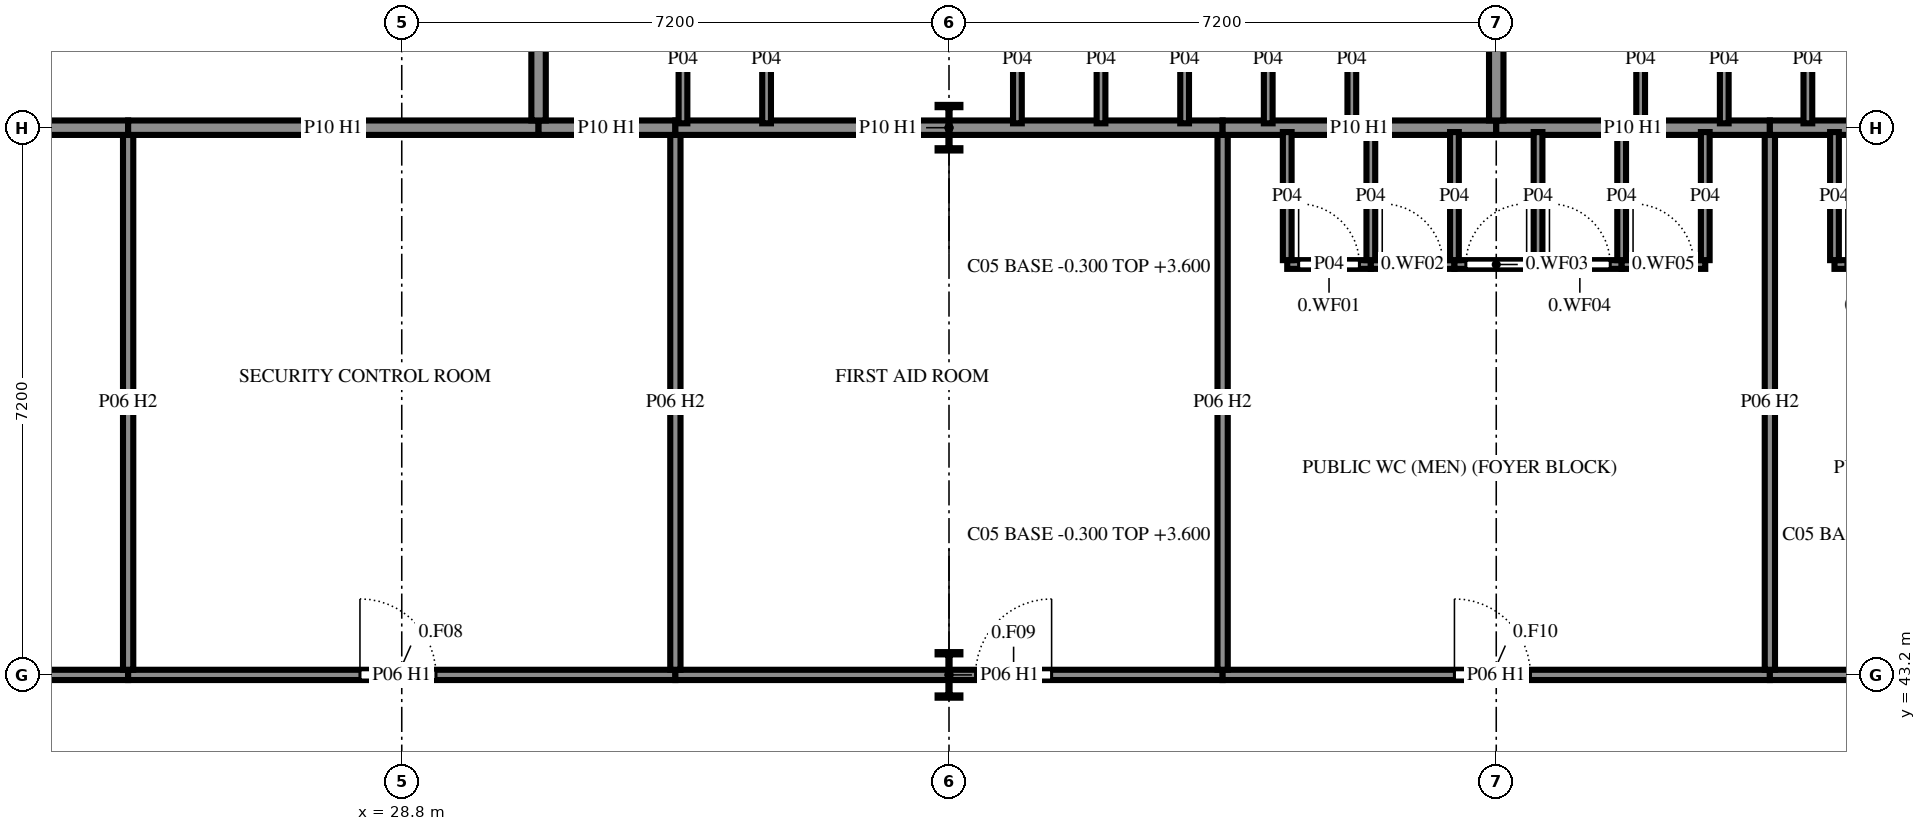
"""IFC4 building model, lengths in metres.
Left out: names, types, materials, properties, quantities, classifications, styles, units other than length and angle.
Written with IfcOpenShell. Run it as: python <this file> out.ifc"""

import sys

from ifc_helpers import new_model, si_unit, direction, frame, frame_2d, origin, origin_2d, place, context, subcontext, project, spatial, rectangle, i_section, extrude, element, fill, save


model = new_model("IFC4")
c1 = context("Model", 3, precision=1e-05, world=origin(), true_north=direction((0.0, 1.0)))
c2 = subcontext(c1, "Body", "Model", "MODEL_VIEW")
j1 = project(units=[si_unit("LENGTHUNIT", "METRE"), si_unit("PLANEANGLEUNIT", "RADIAN")], contexts=[c1])
p1 = place(None, origin())
s1 = spatial("IfcSite", under=j1, at=p1, CompositionType="ELEMENT")
p2 = place(p1, origin())
s2 = spatial("IfcBuilding", under=s1, at=p2, CompositionType="ELEMENT")
p3 = place(p2, origin())
s3 = spatial("IfcBuildingStorey", under=s2, at=p3, CompositionType="ELEMENT", Elevation=0.0)
for number, where, z_axis, x_axis in (
    (1, (36.0, 43.2, -0.3), (0.0, 0.0, 1.0), (1.0, 0.0, 0.0)),
    (2, (36.0, 50.4, -0.3), (0.0, 0.0, 1.0), (1.0, 0.0, 0.0)),
):
    element("IfcColumn", number, at=place(p3, frame(where, z_axis=z_axis, x_axis=x_axis)), inside=s3, PredefinedType="COLUMN", context=c2, shape_type="SweptSolid", body=[
        extrude(i_section(OverallWidth=0.3, OverallDepth=0.6, WebThickness=0.015, FlangeThickness=0.03, FilletRadius=0.027, at=origin_2d()), origin(), (0.0, 0.0, 1.0), 3.9),
    ])
p4 = place(p3, frame((17.933, 43.2, 0.0), z_axis=(0.0, 0.0, 1.0), x_axis=(1.0, 0.0, 0.0)))
e3 = element("IfcWall", 3, at=p4, inside=s3, PredefinedType="PARTITIONING", context=c2, shape_type="SweptSolid", body=[
    extrude(rectangle(XDim=7.267, YDim=0.135, at=frame_2d((3.634, 0.0))), origin(), (0.0, 0.0, 1.0), 2.82),
])
p5 = place(p4, frame((2.25, 0.0, 0.0)))
e4 = element("IfcOpeningElement", 4, at=p5, cuts=e3, PredefinedType="OPENING", context=c2, shape_type="SweptSolid", body=[
    extrude(rectangle(XDim=1.0, YDim=2.4, at=frame_2d((0.5, 1.2))), frame((0.0, 0.077, 0.0), z_axis=(0.0, -1.0, 0.0), x_axis=(1.0, 0.0, 0.0)), (0.0, 0.0, 1.0), 0.155),
])
p6 = place(p3, frame((25.2, 43.2, 0.0), z_axis=(0.0, 0.0, 1.0), x_axis=(1.0, 0.0, 0.0)))
e5 = element("IfcWall", 5, at=p6, inside=s3, PredefinedType="PARTITIONING", context=c2, shape_type="SweptSolid", body=[
    extrude(rectangle(XDim=7.2, YDim=0.135, at=frame_2d((3.6, 0.0))), origin(), (0.0, 0.0, 1.0), 2.82),
])
p7 = place(p6, frame((3.05, 0.0, 0.0)))
e6 = element("IfcOpeningElement", 6, at=p7, cuts=e5, PredefinedType="OPENING", context=c2, shape_type="SweptSolid", body=[
    extrude(rectangle(XDim=1.0, YDim=2.4, at=frame_2d((0.5, 1.2))), frame((0.0, 0.077, 0.0), z_axis=(0.0, -1.0, 0.0), x_axis=(1.0, 0.0, 0.0)), (0.0, 0.0, 1.0), 0.155),
])
p8 = place(p3, frame((32.4, 43.2, 0.0), z_axis=(0.0, 0.0, 1.0), x_axis=(1.0, 0.0, 0.0)))
e7 = element("IfcWall", 7, at=p8, inside=s3, PredefinedType="PARTITIONING", context=c2, shape_type="SweptSolid", body=[
    extrude(rectangle(XDim=7.2, YDim=0.135, at=frame_2d((3.6, 0.0))), origin(), (0.0, 0.0, 1.0), 2.82),
])
p9 = place(p8, frame((3.95, 0.0, 0.0)))
e8 = element("IfcOpeningElement", 8, at=p9, cuts=e7, PredefinedType="OPENING", context=c2, shape_type="SweptSolid", body=[
    extrude(rectangle(XDim=1.0, YDim=2.4, at=frame_2d((0.5, 1.2))), frame((0.0, 0.077, 0.0), z_axis=(0.0, -1.0, 0.0), x_axis=(1.0, 0.0, 0.0)), (0.0, 0.0, 1.0), 0.155),
])
p10 = place(p3, frame((39.6, 43.2, 0.0), z_axis=(0.0, 0.0, 1.0), x_axis=(1.0, 0.0, 0.0)))
e9 = element("IfcWall", 9, at=p10, inside=s3, PredefinedType="PARTITIONING", context=c2, shape_type="SweptSolid", body=[
    extrude(rectangle(XDim=7.2, YDim=0.135, at=frame_2d((3.6, 0.0))), origin(), (0.0, 0.0, 1.0), 2.82),
])
p11 = place(p10, frame((3.05, 0.0, 0.0)))
e10 = element("IfcOpeningElement", 10, at=p11, cuts=e9, PredefinedType="OPENING", context=c2, shape_type="SweptSolid", body=[
    extrude(rectangle(XDim=1.0, YDim=2.4, at=frame_2d((0.5, 1.2))), frame((0.0, 0.077, 0.0), z_axis=(0.0, -1.0, 0.0), x_axis=(1.0, 0.0, 0.0)), (0.0, 0.0, 1.0), 0.155),
])
p12 = place(p3, frame((46.8, 43.2, 0.0), z_axis=(0.0, 0.0, 1.0), x_axis=(1.0, 0.0, 0.0)))
e11 = element("IfcWall", 11, at=p12, inside=s3, PredefinedType="PARTITIONING", context=c2, shape_type="SweptSolid", body=[
    extrude(rectangle(XDim=7.2, YDim=0.135, at=frame_2d((3.6, 0.0))), origin(), (0.0, 0.0, 1.0), 2.82),
])
p13 = place(p12, frame((3.95, 0.0, 0.0)))
e12 = element("IfcOpeningElement", 12, at=p13, cuts=e11, PredefinedType="OPENING", context=c2, shape_type="SweptSolid", body=[
    extrude(rectangle(XDim=1.0, YDim=2.4, at=frame_2d((0.5, 1.2))), frame((0.0, 0.077, 0.0), z_axis=(0.0, -1.0, 0.0), x_axis=(1.0, 0.0, 0.0)), (0.0, 0.0, 1.0), 0.155),
])
p14 = place(p3, frame((25.2, 50.305, 0.0), z_axis=(0.0, 0.0, 1.0), x_axis=(0.0, -1.0, 0.0)))
e13 = element("IfcWall", 13, at=p14, inside=s3, PredefinedType="PARTITIONING", context=c2, shape_type="SweptSolid", body=[
    extrude(rectangle(XDim=7.037, YDim=0.135, at=frame_2d((3.519, 0.0))), origin(), (0.0, 0.0, 1.0), 3.12),
])
p15 = place(p3, frame((21.6, 50.4, 0.0), z_axis=(0.0, 0.0, 1.0), x_axis=(1.0, 0.0, 0.0)))
e14 = element("IfcWall", 14, at=p15, inside=s3, PredefinedType="PARTITIONING", context=c2, shape_type="SweptSolid", body=[
    extrude(rectangle(XDim=3.6, YDim=0.19, at=frame_2d((1.8, 0.0))), origin(), (0.0, 0.0, 1.0), 2.82),
])
p16 = place(p3, frame((32.4, 50.305, 0.0), z_axis=(0.0, 0.0, 1.0), x_axis=(0.0, -1.0, 0.0)))
e15 = element("IfcWall", 15, at=p16, inside=s3, PredefinedType="PARTITIONING", context=c2, shape_type="SweptSolid", body=[
    extrude(rectangle(XDim=7.037, YDim=0.135, at=frame_2d((3.519, 0.0))), origin(), (0.0, 0.0, 1.0), 3.12),
])
p17 = place(p3, frame((25.2, 50.4, 0.0), z_axis=(0.0, 0.0, 1.0), x_axis=(1.0, 0.0, 0.0)))
e16 = element("IfcWall", 16, at=p17, inside=s3, PredefinedType="PARTITIONING", context=c2, shape_type="SweptSolid", body=[
    extrude(rectangle(XDim=5.4, YDim=0.19, at=frame_2d((2.7, 0.0))), origin(), (0.0, 0.0, 1.0), 2.82),
])
p18 = place(p3, frame((30.6, 50.4, 0.0), z_axis=(0.0, 0.0, 1.0), x_axis=(1.0, 0.0, 0.0)))
e17 = element("IfcWall", 17, at=p18, inside=s3, PredefinedType="PARTITIONING", context=c2, shape_type="SweptSolid", body=[
    extrude(rectangle(XDim=1.8, YDim=0.19, at=frame_2d((0.9, 0.0))), origin(), (0.0, 0.0, 1.0), 2.82),
])
p19 = place(p3, frame((39.6, 50.305, 0.0), z_axis=(0.0, 0.0, 1.0), x_axis=(0.0, -1.0, 0.0)))
e18 = element("IfcWall", 18, at=p19, inside=s3, PredefinedType="PARTITIONING", context=c2, shape_type="SweptSolid", body=[
    extrude(rectangle(XDim=7.037, YDim=0.135, at=frame_2d((3.519, 0.0))), origin(), (0.0, 0.0, 1.0), 3.12),
])
p20 = place(p3, frame((32.4, 50.4, 0.0), z_axis=(0.0, 0.0, 1.0), x_axis=(1.0, 0.0, 0.0)))
e19 = element("IfcWall", 19, at=p20, inside=s3, PredefinedType="PARTITIONING", context=c2, shape_type="SweptSolid", body=[
    extrude(rectangle(XDim=7.2, YDim=0.19, at=frame_2d((3.6, 0.0))), origin(), (0.0, 0.0, 1.0), 2.82),
])
p21 = place(p3, frame((46.8, 50.305, 0.0), z_axis=(0.0, 0.0, 1.0), x_axis=(0.0, -1.0, 0.0)))
e20 = element("IfcWall", 20, at=p21, inside=s3, PredefinedType="PARTITIONING", context=c2, shape_type="SweptSolid", body=[
    extrude(rectangle(XDim=7.037, YDim=0.135, at=frame_2d((3.519, 0.0))), origin(), (0.0, 0.0, 1.0), 3.12),
])
p22 = place(p3, frame((39.6, 50.4, 0.0), z_axis=(0.0, 0.0, 1.0), x_axis=(1.0, 0.0, 0.0)))
e21 = element("IfcWall", 21, at=p22, inside=s3, PredefinedType="PARTITIONING", context=c2, shape_type="SweptSolid", body=[
    extrude(rectangle(XDim=3.6, YDim=0.19, at=frame_2d((1.8, 0.0))), origin(), (0.0, 0.0, 1.0), 2.82),
])
p23 = place(p3, frame((43.2, 50.4, 0.0), z_axis=(0.0, 0.0, 1.0), x_axis=(1.0, 0.0, 0.0)))
e22 = element("IfcWall", 22, at=p23, inside=s3, PredefinedType="PARTITIONING", context=c2, shape_type="SweptSolid", body=[
    extrude(rectangle(XDim=3.6, YDim=0.19, at=frame_2d((1.8, 0.0))), origin(), (0.0, 0.0, 1.0), 2.82),
])
p24 = place(p3, frame((46.8, 50.4, 0.0), z_axis=(0.0, 0.0, 1.0), x_axis=(1.0, 0.0, 0.0)))
e23 = element("IfcWall", 23, at=p24, inside=s3, PredefinedType="PARTITIONING", context=c2, shape_type="SweptSolid", body=[
    extrude(rectangle(XDim=7.2, YDim=0.19, at=frame_2d((3.6, 0.0))), origin(), (0.0, 0.0, 1.0), 2.82),
])
p25 = place(p3, frame((30.6, 58.105, 0.0), z_axis=(0.0, 0.0, 1.0), x_axis=(0.0, -1.0, 0.0)))
e24 = element("IfcWall", 24, at=p25, inside=s3, PredefinedType="PARTITIONING", context=c2, shape_type="SweptSolid", body=[
    extrude(rectangle(XDim=7.61, YDim=0.19, at=frame_2d((3.805, 0.0))), origin(), (0.0, 0.0, 1.0), 3.42),
])
p26 = place(p3, frame((43.2, 58.105, 0.0), z_axis=(0.0, 0.0, 1.0), x_axis=(0.0, -1.0, 0.0)))
e25 = element("IfcWall", 25, at=p26, inside=s3, PredefinedType="PARTITIONING", context=c2, shape_type="SweptSolid", body=[
    extrude(rectangle(XDim=7.61, YDim=0.19, at=frame_2d((3.805, 0.0))), origin(), (0.0, 0.0, 1.0), 3.11),
])
p27 = place(p3, frame((40.45, 48.6, 0.0), z_axis=(0.0, 0.0, 1.0), x_axis=(1.0, 0.0, 0.0)))
e26 = element("IfcWall", 26, at=p27, inside=s3, PredefinedType="PARTITIONING", context=c2, shape_type="SweptSolid", body=[
    extrude(rectangle(XDim=1.1, YDim=0.115, at=frame_2d((0.55, 0.0))), origin(), (0.0, 0.0, 1.0), 3.42),
])
p28 = place(p27, frame((0.15, 0.0, 0.0)))
e27 = element("IfcOpeningElement", 27, at=p28, cuts=e26, PredefinedType="OPENING", context=c2, shape_type="SweptSolid", body=[
    extrude(rectangle(XDim=0.8, YDim=2.1, at=frame_2d((0.4, 1.05))), frame((0.0, 0.067, 0.0), z_axis=(0.0, -1.0, 0.0), x_axis=(1.0, 0.0, 0.0)), (0.0, 0.0, 1.0), 0.135),
])
p29 = place(p3, frame((40.45, 50.343, 0.0), z_axis=(0.0, 0.0, 1.0), x_axis=(0.0, -1.0, 0.0)))
e28 = element("IfcWall", 28, at=p29, inside=s3, PredefinedType="PARTITIONING", context=c2, shape_type="SweptSolid", body=[
    extrude(rectangle(XDim=1.685, YDim=0.115, at=frame_2d((0.843, 0.0))), origin(), (0.0, 0.0, 1.0), 3.42),
])
p30 = place(p3, frame((41.55, 48.6, 0.0), z_axis=(0.0, 0.0, 1.0), x_axis=(1.0, 0.0, 0.0)))
e29 = element("IfcWall", 29, at=p30, inside=s3, PredefinedType="PARTITIONING", context=c2, shape_type="SweptSolid", body=[
    extrude(rectangle(XDim=1.1, YDim=0.115, at=frame_2d((0.55, 0.0))), origin(), (0.0, 0.0, 1.0), 3.42),
])
p31 = place(p30, frame((0.15, 0.0, 0.0)))
e30 = element("IfcOpeningElement", 30, at=p31, cuts=e29, PredefinedType="OPENING", context=c2, shape_type="SweptSolid", body=[
    extrude(rectangle(XDim=0.8, YDim=2.1, at=frame_2d((0.4, 1.05))), frame((0.0, 0.067, 0.0), z_axis=(0.0, -1.0, 0.0), x_axis=(1.0, 0.0, 0.0)), (0.0, 0.0, 1.0), 0.135),
])
p32 = place(p3, frame((41.55, 50.343, 0.0), z_axis=(0.0, 0.0, 1.0), x_axis=(0.0, -1.0, 0.0)))
e31 = element("IfcWall", 31, at=p32, inside=s3, PredefinedType="PARTITIONING", context=c2, shape_type="SweptSolid", body=[
    extrude(rectangle(XDim=1.685, YDim=0.115, at=frame_2d((0.843, 0.0))), origin(), (0.0, 0.0, 1.0), 3.42),
])
p33 = place(p3, frame((42.65, 48.6, 0.0), z_axis=(0.0, 0.0, 1.0), x_axis=(1.0, 0.0, 0.0)))
e32 = element("IfcWall", 32, at=p33, inside=s3, PredefinedType="PARTITIONING", context=c2, shape_type="SweptSolid", body=[
    extrude(rectangle(XDim=1.1, YDim=0.115, at=frame_2d((0.55, 0.0))), origin(), (0.0, 0.0, 1.0), 3.42),
])
p34 = place(p33, frame((0.15, 0.0, 0.0)))
e33 = element("IfcOpeningElement", 33, at=p34, cuts=e32, PredefinedType="OPENING", context=c2, shape_type="SweptSolid", body=[
    extrude(rectangle(XDim=0.8, YDim=2.1, at=frame_2d((0.4, 1.05))), frame((0.0, 0.067, 0.0), z_axis=(0.0, -1.0, 0.0), x_axis=(1.0, 0.0, 0.0)), (0.0, 0.0, 1.0), 0.135),
])
p35 = place(p3, frame((42.65, 50.343, 0.0), z_axis=(0.0, 0.0, 1.0), x_axis=(0.0, -1.0, 0.0)))
e34 = element("IfcWall", 34, at=p35, inside=s3, PredefinedType="PARTITIONING", context=c2, shape_type="SweptSolid", body=[
    extrude(rectangle(XDim=1.685, YDim=0.115, at=frame_2d((0.843, 0.0))), origin(), (0.0, 0.0, 1.0), 3.42),
])
p36 = place(p3, frame((43.75, 48.6, 0.0), z_axis=(0.0, 0.0, 1.0), x_axis=(1.0, 0.0, 0.0)))
e35 = element("IfcWall", 35, at=p36, inside=s3, PredefinedType="PARTITIONING", context=c2, shape_type="SweptSolid", body=[
    extrude(rectangle(XDim=1.1, YDim=0.115, at=frame_2d((0.55, 0.0))), origin(), (0.0, 0.0, 1.0), 3.42),
])
p37 = place(p36, frame((0.15, 0.0, 0.0)))
e36 = element("IfcOpeningElement", 36, at=p37, cuts=e35, PredefinedType="OPENING", context=c2, shape_type="SweptSolid", body=[
    extrude(rectangle(XDim=0.8, YDim=2.1, at=frame_2d((0.4, 1.05))), frame((0.0, 0.067, 0.0), z_axis=(0.0, -1.0, 0.0), x_axis=(1.0, 0.0, 0.0)), (0.0, 0.0, 1.0), 0.135),
])
p38 = place(p3, frame((43.75, 50.343, 0.0), z_axis=(0.0, 0.0, 1.0), x_axis=(0.0, -1.0, 0.0)))
e37 = element("IfcWall", 37, at=p38, inside=s3, PredefinedType="PARTITIONING", context=c2, shape_type="SweptSolid", body=[
    extrude(rectangle(XDim=1.685, YDim=0.115, at=frame_2d((0.843, 0.0))), origin(), (0.0, 0.0, 1.0), 3.42),
])
p39 = place(p3, frame((44.85, 48.6, 0.0), z_axis=(0.0, 0.0, 1.0), x_axis=(1.0, 0.0, 0.0)))
e38 = element("IfcWall", 38, at=p39, inside=s3, PredefinedType="PARTITIONING", context=c2, shape_type="SweptSolid", body=[
    extrude(rectangle(XDim=1.1, YDim=0.115, at=frame_2d((0.55, 0.0))), origin(), (0.0, 0.0, 1.0), 3.42),
])
p40 = place(p39, frame((0.15, 0.0, 0.0)))
e39 = element("IfcOpeningElement", 39, at=p40, cuts=e38, PredefinedType="OPENING", context=c2, shape_type="SweptSolid", body=[
    extrude(rectangle(XDim=0.8, YDim=2.1, at=frame_2d((0.4, 1.05))), frame((0.0, 0.067, 0.0), z_axis=(0.0, -1.0, 0.0), x_axis=(1.0, 0.0, 0.0)), (0.0, 0.0, 1.0), 0.135),
])
for number, where, z_axis, x_axis in (
    (40, (44.85, 50.343, 0.0), (0.0, 0.0, 1.0), (0.0, -1.0, 0.0)),
    (41, (45.95, 50.343, 0.0), (0.0, 0.0, 1.0), (0.0, -1.0, 0.0)),
):
    element("IfcWall", number, at=place(p3, frame(where, z_axis=z_axis, x_axis=x_axis)), inside=s3, PredefinedType="PARTITIONING", context=c2, shape_type="SweptSolid", body=[
        extrude(rectangle(XDim=1.685, YDim=0.115, at=frame_2d((0.843, 0.0))), origin(), (0.0, 0.0, 1.0), 3.42),
    ])
p41 = place(p3, frame((47.65, 48.6, 0.0), z_axis=(0.0, 0.0, 1.0), x_axis=(1.0, 0.0, 0.0)))
e42 = element("IfcWall", 42, at=p41, inside=s3, PredefinedType="PARTITIONING", context=c2, shape_type="SweptSolid", body=[
    extrude(rectangle(XDim=1.1, YDim=0.115, at=frame_2d((0.55, 0.0))), origin(), (0.0, 0.0, 1.0), 3.42),
])
p42 = place(p41, frame((0.15, 0.0, 0.0)))
e43 = element("IfcOpeningElement", 43, at=p42, cuts=e42, PredefinedType="OPENING", context=c2, shape_type="SweptSolid", body=[
    extrude(rectangle(XDim=0.8, YDim=2.1, at=frame_2d((0.4, 1.05))), frame((0.0, 0.067, 0.0), z_axis=(0.0, -1.0, 0.0), x_axis=(1.0, 0.0, 0.0)), (0.0, 0.0, 1.0), 0.135),
])
for number, where, z_axis, x_axis in (
    (44, (47.65, 50.343, 0.0), (0.0, 0.0, 1.0), (0.0, -1.0, 0.0)),
    (45, (32.5, 50.458, 0.0), (0.0, 0.0, 1.0), (0.0, 1.0, 0.0)),
    (46, (33.6, 50.458, 0.0), (0.0, 0.0, 1.0), (0.0, 1.0, 0.0)),
    (47, (36.9, 50.458, 0.0), (0.0, 0.0, 1.0), (0.0, 1.0, 0.0)),
    (48, (38.0, 50.458, 0.0), (0.0, 0.0, 1.0), (0.0, 1.0, 0.0)),
    (49, (39.1, 50.458, 0.0), (0.0, 0.0, 1.0), (0.0, 1.0, 0.0)),
    (50, (40.2, 50.458, 0.0), (0.0, 0.0, 1.0), (0.0, 1.0, 0.0)),
    (51, (41.3, 50.458, 0.0), (0.0, 0.0, 1.0), (0.0, 1.0, 0.0)),
    (52, (45.1, 50.458, 0.0), (0.0, 0.0, 1.0), (0.0, 1.0, 0.0)),
    (53, (46.2, 50.458, 0.0), (0.0, 0.0, 1.0), (0.0, 1.0, 0.0)),
    (54, (47.3, 50.458, 0.0), (0.0, 0.0, 1.0), (0.0, 1.0, 0.0)),
):
    element("IfcWall", number, at=place(p3, frame(where, z_axis=z_axis, x_axis=x_axis)), inside=s3, PredefinedType="PARTITIONING", context=c2, shape_type="SweptSolid", body=[
        extrude(rectangle(XDim=1.685, YDim=0.115, at=frame_2d((0.843, 0.0))), origin(), (0.0, 0.0, 1.0), 3.42),
    ])
p43 = place(p7, origin())
e55 = element("IfcDoor", 55, at=p43, inside=s3, OperationType="SINGLE_SWING_RIGHT", PredefinedType="DOOR", context=c2, shape_type="SweptSolid", body=[
    extrude(rectangle(XDim=1.0, YDim=2.4, at=frame_2d((0.5, 1.2))), frame((0.0, 0.025, 0.0), z_axis=(0.0, -1.0, 0.0), x_axis=(1.0, 0.0, 0.0)), (0.0, 0.0, 1.0), 0.05),
])
fill(e6, e55)
p44 = place(p9, origin())
e56 = element("IfcDoor", 56, at=p44, inside=s3, OperationType="SINGLE_SWING_LEFT", PredefinedType="DOOR", context=c2, shape_type="SweptSolid", body=[
    extrude(rectangle(XDim=1.0, YDim=2.4, at=frame_2d((0.5, 1.2))), frame((0.0, 0.025, 0.0), z_axis=(0.0, -1.0, 0.0), x_axis=(1.0, 0.0, 0.0)), (0.0, 0.0, 1.0), 0.05),
])
fill(e8, e56)
p45 = place(p11, origin())
e57 = element("IfcDoor", 57, at=p45, inside=s3, OperationType="SINGLE_SWING_RIGHT", PredefinedType="DOOR", context=c2, shape_type="SweptSolid", body=[
    extrude(rectangle(XDim=1.0, YDim=2.4, at=frame_2d((0.5, 1.2))), frame((0.0, 0.025, 0.0), z_axis=(0.0, -1.0, 0.0), x_axis=(1.0, 0.0, 0.0)), (0.0, 0.0, 1.0), 0.05),
])
fill(e10, e57)
p46 = place(p28, origin())
e58 = element("IfcDoor", 58, at=p46, inside=s3, OperationType="SINGLE_SWING_RIGHT", PredefinedType="DOOR", context=c2, shape_type="SweptSolid", body=[
    extrude(rectangle(XDim=0.8, YDim=2.1, at=frame_2d((0.4, 1.05))), frame((0.0, 0.025, 0.0), z_axis=(0.0, -1.0, 0.0), x_axis=(1.0, 0.0, 0.0)), (0.0, 0.0, 1.0), 0.05),
])
fill(e27, e58)
p47 = place(p31, origin())
e59 = element("IfcDoor", 59, at=p47, inside=s3, OperationType="SINGLE_SWING_RIGHT", PredefinedType="DOOR", context=c2, shape_type="SweptSolid", body=[
    extrude(rectangle(XDim=0.8, YDim=2.1, at=frame_2d((0.4, 1.05))), frame((0.0, 0.025, 0.0), z_axis=(0.0, -1.0, 0.0), x_axis=(1.0, 0.0, 0.0)), (0.0, 0.0, 1.0), 0.05),
])
fill(e30, e59)
p48 = place(p34, origin())
e60 = element("IfcDoor", 60, at=p48, inside=s3, OperationType="SINGLE_SWING_LEFT", PredefinedType="DOOR", context=c2, shape_type="SweptSolid", body=[
    extrude(rectangle(XDim=0.8, YDim=2.1, at=frame_2d((0.4, 1.05))), frame((0.0, 0.025, 0.0), z_axis=(0.0, -1.0, 0.0), x_axis=(1.0, 0.0, 0.0)), (0.0, 0.0, 1.0), 0.05),
])
fill(e33, e60)
p49 = place(p37, origin())
e61 = element("IfcDoor", 61, at=p49, inside=s3, OperationType="SINGLE_SWING_RIGHT", PredefinedType="DOOR", context=c2, shape_type="SweptSolid", body=[
    extrude(rectangle(XDim=0.8, YDim=2.1, at=frame_2d((0.4, 1.05))), frame((0.0, 0.025, 0.0), z_axis=(0.0, -1.0, 0.0), x_axis=(1.0, 0.0, 0.0)), (0.0, 0.0, 1.0), 0.05),
])
fill(e36, e61)
p50 = place(p40, origin())
e62 = element("IfcDoor", 62, at=p50, inside=s3, OperationType="SINGLE_SWING_RIGHT", PredefinedType="DOOR", context=c2, shape_type="SweptSolid", body=[
    extrude(rectangle(XDim=0.8, YDim=2.1, at=frame_2d((0.4, 1.05))), frame((0.0, 0.025, 0.0), z_axis=(0.0, -1.0, 0.0), x_axis=(1.0, 0.0, 0.0)), (0.0, 0.0, 1.0), 0.05),
])
fill(e39, e62)
p51 = place(p42, origin())
e63 = element("IfcDoor", 63, at=p51, inside=s3, OperationType="SINGLE_SWING_RIGHT", PredefinedType="DOOR", context=c2, shape_type="SweptSolid", body=[
    extrude(rectangle(XDim=0.8, YDim=2.1, at=frame_2d((0.4, 1.05))), frame((0.0, 0.025, 0.0), z_axis=(0.0, -1.0, 0.0), x_axis=(1.0, 0.0, 0.0)), (0.0, 0.0, 1.0), 0.05),
])
fill(e43, e63)
save(model, sys.argv[1])
